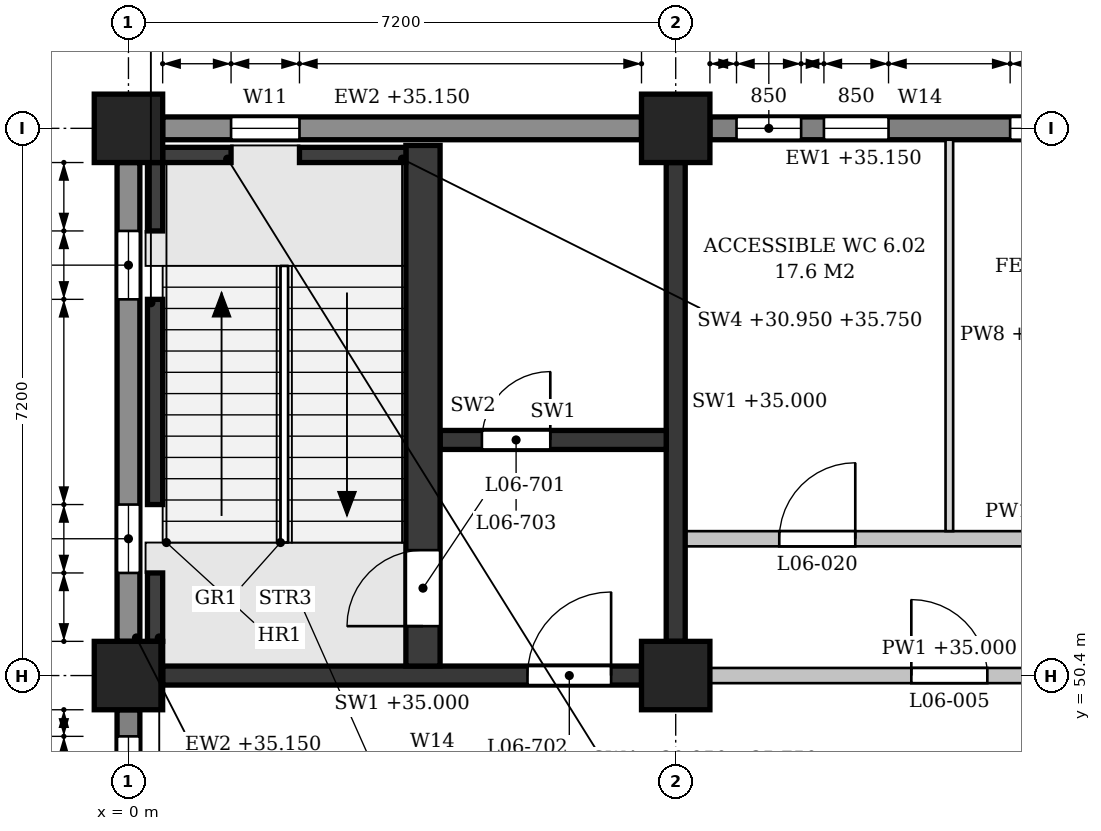
"""IFC4 building model, lengths in metres.
Left out: names, types, materials, properties, quantities, classifications, styles, units other than length and angle.
Written with IfcOpenShell. Run it as: python <this file> out.ifc"""

import sys

from ifc_helpers import new_model, si_unit, direction, frame, frame_2d, origin, origin_2d, place, context, subcontext, project, spatial, polyline, rectangle, outline, extrude, element, fill, save


model = new_model("IFC4")
c1 = context("Model", 3, precision=1e-05, world=origin(), true_north=direction((0.0, 1.0)))
c2 = subcontext(c1, "Body", "Model", "MODEL_VIEW")
j1 = project(units=[si_unit("LENGTHUNIT", "METRE"), si_unit("PLANEANGLEUNIT", "RADIAN")], contexts=[c1])
p1 = place(None, origin())
s1 = spatial("IfcSite", under=j1, at=p1, CompositionType="ELEMENT")
p2 = place(p1, origin())
s2 = spatial("IfcBuilding", under=s1, at=p2, CompositionType="ELEMENT")
p3 = place(p2, frame((0.0, 0.0, 31.2)))
s3 = spatial("IfcBuildingStorey", under=s2, at=p3, CompositionType="ELEMENT", Elevation=31.2)
for number, where, z_axis, x_axis in (
    (1, (0.0, 50.4, 0.0), (0.0, 0.0, 1.0), (1.0, 0.0, 0.0)),
    (2, (0.0, 57.6, 0.0), (0.0, 0.0, 1.0), (1.0, 0.0, 0.0)),
    (3, (7.2, 50.4, 0.0), (0.0, 0.0, 1.0), (1.0, 0.0, 0.0)),
    (4, (7.2, 57.6, 0.0), (0.0, 0.0, 1.0), (1.0, 0.0, 0.0)),
):
    element("IfcColumn", number, at=place(p3, frame(where, z_axis=z_axis, x_axis=x_axis)), inside=s3, PredefinedType="COLUMN", context=c2, shape_type="SweptSolid", body=[
        extrude(rectangle(XDim=0.9, YDim=0.9, at=origin_2d()), origin(), (0.0, 0.0, 1.0), 4.8),
    ])
p4 = place(p3, frame((0.0, 43.65, 0.0), z_axis=(0.0, 0.0, 1.0), x_axis=(0.0, 1.0, 0.0)))
e5 = element("IfcWall", 5, at=p4, inside=s3, PredefinedType="STANDARD", context=c2, shape_type="SweptSolid", body=[
    extrude(rectangle(XDim=6.3, YDim=0.3, at=frame_2d((3.15, 0.0))), origin(), (0.0, 0.0, 1.0), 3.95),
])
p5 = place(p4, frame((0.35, 0.0, 0.9)))
e6 = element("IfcOpeningElement", 6, at=p5, cuts=e5, PredefinedType="OPENING", context=c2, shape_type="SweptSolid", body=[
    extrude(outline(polyline([(0.0, 0.0), (0.85, 0.0), (0.85, 2.05), (0.425, 2.5), (0.0, 2.05), (0.0, 0.0)])), frame((0.0, 0.16, 0.0), z_axis=(0.0, -1.0, 0.0), x_axis=(1.0, 0.0, 0.0)), (0.0, 0.0, 1.0), 0.32),
])
p6 = place(p4, frame((1.5, 0.0, 0.9)))
e7 = element("IfcOpeningElement", 7, at=p6, cuts=e5, PredefinedType="OPENING", context=c2, shape_type="SweptSolid", body=[
    extrude(outline(polyline([(0.0, 0.0), (0.85, 0.0), (0.85, 2.05), (0.425, 2.5), (0.0, 2.05), (0.0, 0.0)])), frame((0.0, 0.16, 0.0), z_axis=(0.0, -1.0, 0.0), x_axis=(1.0, 0.0, 0.0)), (0.0, 0.0, 1.0), 0.32),
])
p7 = place(p4, frame((3.95, 0.0, 0.9)))
e8 = element("IfcOpeningElement", 8, at=p7, cuts=e5, PredefinedType="OPENING", context=c2, shape_type="SweptSolid", body=[
    extrude(outline(polyline([(0.0, 0.0), (0.85, 0.0), (0.85, 2.05), (0.425, 2.5), (0.0, 2.05), (0.0, 0.0)])), frame((0.0, 0.16, 0.0), z_axis=(0.0, -1.0, 0.0), x_axis=(1.0, 0.0, 0.0)), (0.0, 0.0, 1.0), 0.32),
])
p8 = place(p4, frame((5.1, 0.0, 0.9)))
e9 = element("IfcOpeningElement", 9, at=p8, cuts=e5, PredefinedType="OPENING", context=c2, shape_type="SweptSolid", body=[
    extrude(outline(polyline([(0.0, 0.0), (0.85, 0.0), (0.85, 2.05), (0.425, 2.5), (0.0, 2.05), (0.0, 0.0)])), frame((0.0, 0.16, 0.0), z_axis=(0.0, -1.0, 0.0), x_axis=(1.0, 0.0, 0.0)), (0.0, 0.0, 1.0), 0.32),
])
p9 = place(p3, frame((0.0, 50.85, 0.0), z_axis=(0.0, 0.0, 1.0), x_axis=(0.0, 1.0, 0.0)))
e10 = element("IfcWall", 10, at=p9, inside=s3, PredefinedType="STANDARD", context=c2, shape_type="SweptSolid", body=[
    extrude(rectangle(XDim=6.3, YDim=0.3, at=frame_2d((3.15, 0.0))), origin(), (0.0, 0.0, 1.0), 3.95),
])
p10 = place(p9, frame((0.9, 0.0, 0.9)))
e11 = element("IfcOpeningElement", 11, at=p10, cuts=e10, PredefinedType="OPENING", context=c2, shape_type="SweptSolid", body=[
    extrude(outline(polyline([(0.0, 0.0), (0.9, 0.0), (0.9, 2.05), (0.45, 2.5), (0.0, 2.05), (0.0, 0.0)])), frame((0.0, 0.16, 0.0), z_axis=(0.0, -1.0, 0.0), x_axis=(1.0, 0.0, 0.0)), (0.0, 0.0, 1.0), 0.32),
])
p11 = place(p9, frame((4.5, 0.0, 0.9)))
e12 = element("IfcOpeningElement", 12, at=p11, cuts=e10, PredefinedType="OPENING", context=c2, shape_type="SweptSolid", body=[
    extrude(outline(polyline([(0.0, 0.0), (0.9, 0.0), (0.9, 2.05), (0.45, 2.5), (0.0, 2.05), (0.0, 0.0)])), frame((0.0, 0.16, 0.0), z_axis=(0.0, -1.0, 0.0), x_axis=(1.0, 0.0, 0.0)), (0.0, 0.0, 1.0), 0.32),
])
p12 = place(p3, frame((13.95, 57.6, 0.0), z_axis=(0.0, 0.0, 1.0), x_axis=(-1.0, 0.0, 0.0)))
e13 = element("IfcWall", 13, at=p12, inside=s3, PredefinedType="STANDARD", context=c2, shape_type="SweptSolid", body=[
    extrude(rectangle(XDim=6.3, YDim=0.3, at=frame_2d((3.15, 0.0))), origin(), (0.0, 0.0, 1.0), 3.95),
])
p13 = place(p12, frame((0.35, 0.0, 0.9)))
e14 = element("IfcOpeningElement", 14, at=p13, cuts=e13, PredefinedType="OPENING", context=c2, shape_type="SweptSolid", body=[
    extrude(outline(polyline([(0.0, 0.0), (0.85, 0.0), (0.85, 2.05), (0.425, 2.5), (0.0, 2.05), (0.0, 0.0)])), frame((0.0, 0.16, 0.0), z_axis=(0.0, -1.0, 0.0), x_axis=(1.0, 0.0, 0.0)), (0.0, 0.0, 1.0), 0.32),
])
p14 = place(p12, frame((1.5, 0.0, 0.9)))
e15 = element("IfcOpeningElement", 15, at=p14, cuts=e13, PredefinedType="OPENING", context=c2, shape_type="SweptSolid", body=[
    extrude(outline(polyline([(0.0, 0.0), (0.85, 0.0), (0.85, 2.05), (0.425, 2.5), (0.0, 2.05), (0.0, 0.0)])), frame((0.0, 0.16, 0.0), z_axis=(0.0, -1.0, 0.0), x_axis=(1.0, 0.0, 0.0)), (0.0, 0.0, 1.0), 0.32),
])
p15 = place(p12, frame((3.95, 0.0, 0.9)))
e16 = element("IfcOpeningElement", 16, at=p15, cuts=e13, PredefinedType="OPENING", context=c2, shape_type="SweptSolid", body=[
    extrude(outline(polyline([(0.0, 0.0), (0.85, 0.0), (0.85, 2.05), (0.425, 2.5), (0.0, 2.05), (0.0, 0.0)])), frame((0.0, 0.16, 0.0), z_axis=(0.0, -1.0, 0.0), x_axis=(1.0, 0.0, 0.0)), (0.0, 0.0, 1.0), 0.32),
])
p16 = place(p12, frame((5.1, 0.0, 0.9)))
e17 = element("IfcOpeningElement", 17, at=p16, cuts=e13, PredefinedType="OPENING", context=c2, shape_type="SweptSolid", body=[
    extrude(outline(polyline([(0.0, 0.0), (0.85, 0.0), (0.85, 2.05), (0.425, 2.5), (0.0, 2.05), (0.0, 0.0)])), frame((0.0, 0.16, 0.0), z_axis=(0.0, -1.0, 0.0), x_axis=(1.0, 0.0, 0.0)), (0.0, 0.0, 1.0), 0.32),
])
p17 = place(p3, frame((6.75, 57.6, 0.0), z_axis=(0.0, 0.0, 1.0), x_axis=(-1.0, 0.0, 0.0)))
e18 = element("IfcWall", 18, at=p17, inside=s3, PredefinedType="STANDARD", context=c2, shape_type="SweptSolid", body=[
    extrude(rectangle(XDim=6.3, YDim=0.3, at=frame_2d((3.15, 0.0))), origin(), (0.0, 0.0, 1.0), 3.95),
])
p18 = place(p17, frame((4.5, 0.0, 0.9)))
e19 = element("IfcOpeningElement", 19, at=p18, cuts=e18, PredefinedType="OPENING", context=c2, shape_type="SweptSolid", body=[
    extrude(outline(polyline([(0.0, 0.0), (0.9, 0.0), (0.9, 2.05), (0.45, 2.5), (0.0, 2.05), (0.0, 0.0)])), frame((0.0, 0.16, 0.0), z_axis=(0.0, -1.0, 0.0), x_axis=(1.0, 0.0, 0.0)), (0.0, 0.0, 1.0), 0.32),
])
p19 = place(p3, frame((0.45, 50.4, 0.0), z_axis=(0.0, 0.0, 1.0), x_axis=(1.0, 0.0, 0.0)))
e20 = element("IfcWall", 20, at=p19, inside=s3, PredefinedType="SHEAR", context=c2, shape_type="SweptSolid", body=[
    extrude(rectangle(XDim=6.3, YDim=0.25, at=frame_2d((3.15, 0.0))), origin(), (0.0, 0.0, 1.0), 3.8),
])
p20 = place(p19, frame((4.8, 0.0, 0.0)))
e21 = element("IfcOpeningElement", 21, at=p20, cuts=e20, PredefinedType="OPENING", context=c2, shape_type="SweptSolid", body=[
    extrude(rectangle(XDim=1.1, YDim=2.1, at=frame_2d((0.55, 1.05))), frame((0.0, 0.135, 0.0), z_axis=(0.0, -1.0, 0.0), x_axis=(1.0, 0.0, 0.0)), (0.0, 0.0, 1.0), 0.27),
])
p21 = place(p3, frame((7.2, 50.85, 0.0), z_axis=(0.0, 0.0, 1.0), x_axis=(0.0, 1.0, 0.0)))
e22 = element("IfcWall", 22, at=p21, inside=s3, PredefinedType="SHEAR", context=c2, shape_type="SweptSolid", body=[
    extrude(rectangle(XDim=6.3, YDim=0.25, at=frame_2d((3.15, 0.0))), origin(), (0.0, 0.0, 1.0), 3.8),
])
p22 = place(p3, frame((0.35, 50.85, -0.25), z_axis=(0.0, 0.0, 1.0), x_axis=(0.0, 1.0, 0.0)))
e23 = element("IfcWall", 23, at=p22, inside=s3, PredefinedType="SHEAR", context=c2, shape_type="SweptSolid", body=[
    extrude(rectangle(XDim=0.9, YDim=0.2, at=frame_2d((0.45, 0.0))), origin(), (0.0, 0.0, 1.0), 4.8),
])
p23 = place(p3, frame((0.35, 52.65, -0.25), z_axis=(0.0, 0.0, 1.0), x_axis=(0.0, 1.0, 0.0)))
e24 = element("IfcWall", 24, at=p23, inside=s3, PredefinedType="SHEAR", context=c2, shape_type="SweptSolid", body=[
    extrude(rectangle(XDim=2.7, YDim=0.2, at=frame_2d((1.35, 0.0))), origin(), (0.0, 0.0, 1.0), 4.8),
])
p24 = place(p3, frame((0.35, 56.25, -0.25), z_axis=(0.0, 0.0, 1.0), x_axis=(0.0, 1.0, 0.0)))
e25 = element("IfcWall", 25, at=p24, inside=s3, PredefinedType="SHEAR", context=c2, shape_type="SweptSolid", body=[
    extrude(rectangle(XDim=0.9, YDim=0.2, at=frame_2d((0.45, 0.0))), origin(), (0.0, 0.0, 1.0), 4.8),
])
p25 = place(p3, frame((0.45, 57.25, -0.25), z_axis=(0.0, 0.0, 1.0), x_axis=(1.0, 0.0, 0.0)))
e26 = element("IfcWall", 26, at=p25, inside=s3, PredefinedType="SHEAR", context=c2, shape_type="SweptSolid", body=[
    extrude(rectangle(XDim=0.9, YDim=0.2, at=frame_2d((0.45, 0.0))), origin(), (0.0, 0.0, 1.0), 4.8),
])
p26 = place(p3, frame((2.25, 57.25, -0.25), z_axis=(0.0, 0.0, 1.0), x_axis=(1.0, 0.0, 0.0)))
e27 = element("IfcWall", 27, at=p26, inside=s3, PredefinedType="SHEAR", context=c2, shape_type="SweptSolid", body=[
    extrude(rectangle(XDim=1.4, YDim=0.2, at=frame_2d((0.7, 0.0))), origin(), (0.0, 0.0, 1.0), 4.8),
])
p27 = place(p3, frame((3.875, 50.525, 0.0), z_axis=(0.0, 0.0, 1.0), x_axis=(0.0, 1.0, 0.0)))
e28 = element("IfcWall", 28, at=p27, inside=s3, PredefinedType="SHEAR", context=c2, shape_type="SweptSolid", body=[
    extrude(rectangle(XDim=6.85, YDim=0.45, at=frame_2d((3.425, 0.0))), origin(), (0.0, 0.0, 1.0), 4.55),
])
p28 = place(p27, frame((0.525, 0.0, 0.0)))
e29 = element("IfcOpeningElement", 29, at=p28, cuts=e28, PredefinedType="OPENING", context=c2, shape_type="SweptSolid", body=[
    extrude(rectangle(XDim=1.0, YDim=2.1, at=frame_2d((0.5, 1.05))), frame((0.0, 0.235, 0.0), z_axis=(0.0, -1.0, 0.0), x_axis=(1.0, 0.0, 0.0)), (0.0, 0.0, 1.0), 0.47),
])
p29 = place(p3, frame((4.1, 53.5, 0.0), z_axis=(0.0, 0.0, 1.0), x_axis=(1.0, 0.0, 0.0)))
e30 = element("IfcWall", 30, at=p29, inside=s3, PredefinedType="SHEAR", context=c2, shape_type="SweptSolid", body=[
    extrude(rectangle(XDim=2.975, YDim=0.25, at=frame_2d((1.487, 0.0))), origin(), (0.0, 0.0, 1.0), 4.55),
])
p30 = place(p29, frame((0.55, 0.0, 0.0)))
e31 = element("IfcOpeningElement", 31, at=p30, cuts=e30, PredefinedType="OPENING", context=c2, shape_type="SweptSolid", body=[
    extrude(rectangle(XDim=0.9, YDim=2.1, at=frame_2d((0.45, 1.05))), frame((0.0, 0.135, 0.0), z_axis=(0.0, -1.0, 0.0), x_axis=(1.0, 0.0, 0.0)), (0.0, 0.0, 1.0), 0.27),
])
p31 = place(p3, frame((7.65, 50.4, 0.0), z_axis=(0.0, 0.0, 1.0), x_axis=(1.0, 0.0, 0.0)))
e32 = element("IfcWall", 32, at=p31, inside=s3, PredefinedType="PARTITIONING", context=c2, shape_type="SweptSolid", body=[
    extrude(rectangle(XDim=6.3, YDim=0.2, at=frame_2d((3.15, 0.0))), origin(), (0.0, 0.0, 1.0), 3.8),
])
p32 = place(p31, frame((2.65, 0.0, 0.0)))
e33 = element("IfcOpeningElement", 33, at=p32, cuts=e32, PredefinedType="OPENING", context=c2, shape_type="SweptSolid", body=[
    extrude(rectangle(XDim=1.0, YDim=2.1, at=frame_2d((0.5, 1.05))), frame((0.0, 0.11, 0.0), z_axis=(0.0, -1.0, 0.0), x_axis=(1.0, 0.0, 0.0)), (0.0, 0.0, 1.0), 0.22),
])
p33 = place(p3, frame((7.325, 52.2, 0.0), z_axis=(0.0, 0.0, 1.0), x_axis=(1.0, 0.0, 0.0)))
e34 = element("IfcWall", 34, at=p33, inside=s3, PredefinedType="PARTITIONING", context=c2, shape_type="SweptSolid", body=[
    extrude(outline(polyline([(0.0, 0.0), (14.15, 0.0), (14.15, 3.8), (14.025, 3.8), (14.025, 4.55), (7.325, 4.55), (7.325, 3.8), (6.825, 3.8), (6.825, 4.55), (0.125, 4.55), (0.125, 3.8), (0.0, 3.8), (0.0, 0.0)])), frame((0.0, 0.1, 0.0), z_axis=(0.0, -1.0, 0.0), x_axis=(1.0, 0.0, 0.0)), (0.0, 0.0, 1.0), 0.2),
])
p34 = place(p33, frame((1.238, 0.0, 0.0)))
e35 = element("IfcOpeningElement", 35, at=p34, cuts=e34, PredefinedType="OPENING", context=c2, shape_type="SweptSolid", body=[
    extrude(rectangle(XDim=1.0, YDim=2.1, at=frame_2d((0.5, 1.05))), frame((0.0, 0.11, 0.0), z_axis=(0.0, -1.0, 0.0), x_axis=(1.0, 0.0, 0.0)), (0.0, 0.0, 1.0), 0.22),
])
p35 = place(p33, frame((4.775, 0.0, 0.0)))
e36 = element("IfcOpeningElement", 36, at=p35, cuts=e34, PredefinedType="OPENING", context=c2, shape_type="SweptSolid", body=[
    extrude(rectangle(XDim=1.0, YDim=2.1, at=frame_2d((0.5, 1.05))), frame((0.0, 0.11, 0.0), z_axis=(0.0, -1.0, 0.0), x_axis=(1.0, 0.0, 0.0)), (0.0, 0.0, 1.0), 0.22),
])
p36 = place(p33, frame((8.375, 0.0, 0.0)))
e37 = element("IfcOpeningElement", 37, at=p36, cuts=e34, PredefinedType="OPENING", context=c2, shape_type="SweptSolid", body=[
    extrude(rectangle(XDim=1.0, YDim=2.1, at=frame_2d((0.5, 1.05))), frame((0.0, 0.11, 0.0), z_axis=(0.0, -1.0, 0.0), x_axis=(1.0, 0.0, 0.0)), (0.0, 0.0, 1.0), 0.22),
])
p37 = place(p33, frame((11.913, 0.0, 0.0)))
e38 = element("IfcOpeningElement", 38, at=p37, cuts=e34, PredefinedType="OPENING", context=c2, shape_type="SweptSolid", body=[
    extrude(rectangle(XDim=1.0, YDim=2.1, at=frame_2d((0.5, 1.05))), frame((0.0, 0.11, 0.0), z_axis=(0.0, -1.0, 0.0), x_axis=(1.0, 0.0, 0.0)), (0.0, 0.0, 1.0), 0.22),
])
p38 = place(p3, frame((10.8, 52.3, 0.0), z_axis=(0.0, 0.0, 1.0), x_axis=(0.0, 1.0, 0.0)))
e39 = element("IfcWall", 39, at=p38, inside=s3, PredefinedType="PARTITIONING", context=c2, shape_type="SweptSolid", body=[
    extrude(rectangle(XDim=5.15, YDim=0.1, at=frame_2d((2.575, 0.0))), origin(), (0.0, 0.0, 1.0), 3.8),
])
p39 = place(p14, origin())
e40 = element("IfcWindow", 40, at=p39, inside=s3, PartitioningType="SINGLE_PANEL", PredefinedType="WINDOW", context=c2, shape_type="SweptSolid", body=[
    extrude(outline(polyline([(0.0, 0.0), (0.85, 0.0), (0.85, 2.05), (0.425, 2.5), (0.0, 2.05), (0.0, 0.0)])), frame((0.0, 0.03, 0.0), z_axis=(0.0, -1.0, 0.0), x_axis=(1.0, 0.0, 0.0)), (0.0, 0.0, 1.0), 0.06),
])
fill(e15, e40)
p40 = place(p15, origin())
e41 = element("IfcWindow", 41, at=p40, inside=s3, PartitioningType="SINGLE_PANEL", PredefinedType="WINDOW", context=c2, shape_type="SweptSolid", body=[
    extrude(outline(polyline([(0.0, 0.0), (0.85, 0.0), (0.85, 2.05), (0.425, 2.5), (0.0, 2.05), (0.0, 0.0)])), frame((0.0, 0.03, 0.0), z_axis=(0.0, -1.0, 0.0), x_axis=(1.0, 0.0, 0.0)), (0.0, 0.0, 1.0), 0.06),
])
fill(e16, e41)
p41 = place(p16, origin())
e42 = element("IfcWindow", 42, at=p41, inside=s3, PartitioningType="SINGLE_PANEL", PredefinedType="WINDOW", context=c2, shape_type="SweptSolid", body=[
    extrude(outline(polyline([(0.0, 0.0), (0.85, 0.0), (0.85, 2.05), (0.425, 2.5), (0.0, 2.05), (0.0, 0.0)])), frame((0.0, 0.03, 0.0), z_axis=(0.0, -1.0, 0.0), x_axis=(1.0, 0.0, 0.0)), (0.0, 0.0, 1.0), 0.06),
])
fill(e17, e42)
p42 = place(p18, origin())
e43 = element("IfcWindow", 43, at=p42, inside=s3, PartitioningType="SINGLE_PANEL", PredefinedType="WINDOW", context=c2, shape_type="SweptSolid", body=[
    extrude(outline(polyline([(0.0, 0.0), (0.9, 0.0), (0.9, 2.05), (0.45, 2.5), (0.0, 2.05), (0.0, 0.0)])), frame((0.0, 0.03, 0.0), z_axis=(0.0, -1.0, 0.0), x_axis=(1.0, 0.0, 0.0)), (0.0, 0.0, 1.0), 0.06),
])
fill(e19, e43)
p43 = place(p8, origin())
e44 = element("IfcWindow", 44, at=p43, inside=s3, PartitioningType="SINGLE_PANEL", PredefinedType="WINDOW", context=c2, shape_type="SweptSolid", body=[
    extrude(outline(polyline([(0.0, 0.0), (0.85, 0.0), (0.85, 2.05), (0.425, 2.5), (0.0, 2.05), (0.0, 0.0)])), frame((0.0, 0.03, 0.0), z_axis=(0.0, -1.0, 0.0), x_axis=(1.0, 0.0, 0.0)), (0.0, 0.0, 1.0), 0.06),
])
fill(e9, e44)
p44 = place(p10, origin())
e45 = element("IfcWindow", 45, at=p44, inside=s3, PartitioningType="SINGLE_PANEL", PredefinedType="WINDOW", context=c2, shape_type="SweptSolid", body=[
    extrude(outline(polyline([(0.0, 0.0), (0.9, 0.0), (0.9, 2.05), (0.45, 2.5), (0.0, 2.05), (0.0, 0.0)])), frame((0.0, 0.03, 0.0), z_axis=(0.0, -1.0, 0.0), x_axis=(1.0, 0.0, 0.0)), (0.0, 0.0, 1.0), 0.06),
])
fill(e11, e45)
p45 = place(p11, origin())
e46 = element("IfcWindow", 46, at=p45, inside=s3, PartitioningType="SINGLE_PANEL", PredefinedType="WINDOW", context=c2, shape_type="SweptSolid", body=[
    extrude(outline(polyline([(0.0, 0.0), (0.9, 0.0), (0.9, 2.05), (0.45, 2.5), (0.0, 2.05), (0.0, 0.0)])), frame((0.0, 0.03, 0.0), z_axis=(0.0, -1.0, 0.0), x_axis=(1.0, 0.0, 0.0)), (0.0, 0.0, 1.0), 0.06),
])
fill(e12, e46)
p46 = place(p28, origin())
e47 = element("IfcDoor", 47, at=p46, inside=s3, OperationType="SINGLE_SWING_LEFT", PredefinedType="DOOR", context=c2, shape_type="SweptSolid", body=[
    extrude(rectangle(XDim=1.0, YDim=2.1, at=frame_2d((0.5, 1.05))), frame((0.0, 0.025, 0.0), z_axis=(0.0, -1.0, 0.0), x_axis=(1.0, 0.0, 0.0)), (0.0, 0.0, 1.0), 0.05),
])
fill(e29, e47)
p47 = place(p20, origin())
e48 = element("IfcDoor", 48, at=p47, inside=s3, OperationType="SINGLE_SWING_RIGHT", PredefinedType="DOOR", context=c2, shape_type="SweptSolid", body=[
    extrude(rectangle(XDim=1.1, YDim=2.1, at=frame_2d((0.55, 1.05))), frame((0.0, 0.025, 0.0), z_axis=(0.0, -1.0, 0.0), x_axis=(1.0, 0.0, 0.0)), (0.0, 0.0, 1.0), 0.05),
])
fill(e21, e48)
p48 = place(p30, origin())
e49 = element("IfcDoor", 49, at=p48, inside=s3, OperationType="SINGLE_SWING_RIGHT", PredefinedType="DOOR", context=c2, shape_type="SweptSolid", body=[
    extrude(rectangle(XDim=0.9, YDim=2.1, at=frame_2d((0.45, 1.05))), frame((0.0, 0.025, 0.0), z_axis=(0.0, -1.0, 0.0), x_axis=(1.0, 0.0, 0.0)), (0.0, 0.0, 1.0), 0.05),
])
fill(e31, e49)
p49 = place(p32, origin())
e50 = element("IfcDoor", 50, at=p49, inside=s3, OperationType="SINGLE_SWING_LEFT", PredefinedType="DOOR", context=c2, shape_type="SweptSolid", body=[
    extrude(rectangle(XDim=1.0, YDim=2.1, at=frame_2d((0.5, 1.05))), frame((0.0, 0.025, 0.0), z_axis=(0.0, -1.0, 0.0), x_axis=(1.0, 0.0, 0.0)), (0.0, 0.0, 1.0), 0.05),
])
fill(e33, e50)
p50 = place(p34, origin())
e51 = element("IfcDoor", 51, at=p50, inside=s3, OperationType="SINGLE_SWING_RIGHT", PredefinedType="DOOR", context=c2, shape_type="SweptSolid", body=[
    extrude(rectangle(XDim=1.0, YDim=2.1, at=frame_2d((0.5, 1.05))), frame((0.0, 0.025, 0.0), z_axis=(0.0, -1.0, 0.0), x_axis=(1.0, 0.0, 0.0)), (0.0, 0.0, 1.0), 0.05),
])
fill(e35, e51)
save(model, sys.argv[1])
